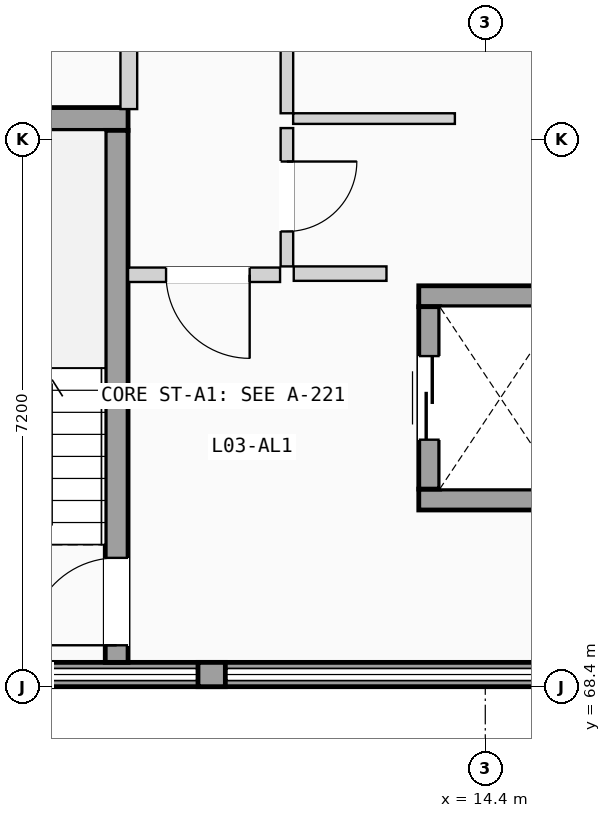
"""IFC4 building model, lengths in metres.
Left out: names, types, materials, properties, quantities, classifications, styles, units other than length and angle.
Written with IfcOpenShell. Run it as: python <this file> out.ifc"""

import sys

from ifc_helpers import new_model, si_unit, direction, frame, frame_2d, origin, place, context, subcontext, project, spatial, rectangle, extrude, element, fill, save


model = new_model("IFC4")
c1 = context("Model", 3, precision=1e-05, world=origin(), true_north=direction((0.0, 1.0)))
c2 = subcontext(c1, "Body", "Model", "MODEL_VIEW")
j1 = project(units=[si_unit("LENGTHUNIT", "METRE"), si_unit("PLANEANGLEUNIT", "RADIAN")], contexts=[c1])
p1 = place(None, origin())
s1 = spatial("IfcSite", under=j1, at=p1, CompositionType="ELEMENT")
p2 = place(p1, origin())
s2 = spatial("IfcBuilding", under=s1, at=p2, CompositionType="ELEMENT")
p3 = place(p2, frame((0.0, 0.0, 12.075)))
s3 = spatial("IfcBuildingStorey", under=s2, at=p3, CompositionType="ELEMENT", Elevation=12.075)
p4 = place(p3, frame((0.0, 68.56, 0.0), z_axis=(0.0, 0.0, 1.0), x_axis=(1.0, 0.0, 0.0)))
e1 = element("IfcWall", 1, at=p4, inside=s3, PredefinedType="SOLIDWALL", context=c2, shape_type="SweptSolid", body=[
    extrude(rectangle(XDim=21.6, YDim=0.32, at=frame_2d((10.8, 0.0))), origin(), (0.0, 0.0, 1.0), 1.11),
])
p5 = place(p3, frame((10.62, 68.56, 1.11), z_axis=(0.0, 0.0, 1.0), x_axis=(1.0, 0.0, 0.0)))
e2 = element("IfcWall", 2, at=p5, inside=s3, PredefinedType="SOLIDWALL", context=c2, shape_type="SweptSolid", body=[
    extrude(rectangle(XDim=0.36, YDim=0.32, at=frame_2d((0.18, 0.0))), origin(), (0.0, 0.0, 1.0), 1.78),
])
p6 = place(p3, frame((5.75, 75.87, 0.0), z_axis=(0.0, 0.0, 1.0), x_axis=(1.0, 0.0, 0.0)))
e3 = element("IfcWall", 3, at=p6, inside=s3, PredefinedType="SHEAR", context=c2, shape_type="SweptSolid", body=[
    extrude(rectangle(XDim=3.95, YDim=0.3, at=frame_2d((1.975, 0.0))), origin(), (0.0, 0.0, 1.0), 2.89),
])
p7 = place(p3, frame((9.55, 68.72, 0.0), z_axis=(0.0, 0.0, 1.0), x_axis=(0.0, 1.0, 0.0)))
e4 = element("IfcWall", 4, at=p7, inside=s3, PredefinedType="SHEAR", context=c2, shape_type="SweptSolid", body=[
    extrude(rectangle(XDim=7.0, YDim=0.3, at=frame_2d((3.5, 0.0))), origin(), (0.0, 0.0, 1.0), 2.89),
])
p8 = place(p7, frame((0.225, 0.0, 0.0)))
e5 = element("IfcOpeningElement", 5, at=p8, cuts=e4, PredefinedType="OPENING", context=c2, shape_type="SweptSolid", body=[
    extrude(rectangle(XDim=1.15, YDim=2.12, at=frame_2d((0.575, 1.06))), frame((0.0, 0.16, 0.0), z_axis=(0.0, -1.0, 0.0), x_axis=(1.0, 0.0, 0.0)), (0.0, 0.0, 1.0), 0.32),
])
for number, where, z_axis, x_axis in (
    (6, (13.525, 70.863, 0.0), (0.0, 0.0, 1.0), (1.0, 0.0, 0.0)),
    (7, (13.525, 73.538, 0.0), (0.0, 0.0, 1.0), (1.0, 0.0, 0.0)),
):
    element("IfcWall", number, at=place(p3, frame(where, z_axis=z_axis, x_axis=x_axis)), inside=s3, PredefinedType="SHEAR", context=c2, shape_type="SweptSolid", body=[
        extrude(rectangle(XDim=2.15, YDim=0.275, at=frame_2d((1.075, 0.0))), origin(), (0.0, 0.0, 1.0), 2.89),
    ])
p9 = place(p3, frame((13.663, 71.0, 0.0), z_axis=(0.0, 0.0, 1.0), x_axis=(0.0, 1.0, 0.0)))
e8 = element("IfcWall", 8, at=p9, inside=s3, PredefinedType="SHEAR", context=c2, shape_type="SweptSolid", body=[
    extrude(rectangle(XDim=2.4, YDim=0.275, at=frame_2d((1.2, 0.0))), origin(), (0.0, 0.0, 1.0), 2.89),
])
p10 = place(p9, frame((0.65, 0.0, 0.0)))
e9 = element("IfcOpeningElement", 9, at=p10, cuts=e8, PredefinedType="OPENING", context=c2, shape_type="SweptSolid", body=[
    extrude(rectangle(XDim=1.1, YDim=2.15, at=frame_2d((0.55, 1.075))), frame((0.0, 0.147, 0.0), z_axis=(0.0, -1.0, 0.0), x_axis=(1.0, 0.0, 0.0)), (0.0, 0.0, 1.0), 0.295),
])
p11 = place(p3, frame((11.88, 73.835, 0.0), z_axis=(0.0, 0.0, 1.0), x_axis=(1.0, 0.0, 0.0)))
e10 = element("IfcWall", 10, at=p11, inside=s3, PredefinedType="PARTITIONING", context=c2, shape_type="SweptSolid", body=[
    extrude(rectangle(XDim=1.22, YDim=0.19, at=frame_2d((0.61, 0.0))), origin(), (0.0, 0.0, 1.0), 2.87),
])
p12 = place(p3, frame((9.7, 73.82, 0.0), z_axis=(0.0, 0.0, 1.0), x_axis=(1.0, 0.0, 0.0)))
e11 = element("IfcWall", 11, at=p12, inside=s3, PredefinedType="PARTITIONING", context=c2, shape_type="SweptSolid", body=[
    extrude(rectangle(XDim=2.0, YDim=0.19, at=frame_2d((1.0, 0.0))), origin(), (0.0, 0.0, 1.0), 2.87),
])
p13 = place(p12, frame((0.5, 0.0, 0.0)))
e12 = element("IfcOpeningElement", 12, at=p13, cuts=e11, PredefinedType="OPENING", context=c2, shape_type="SweptSolid", body=[
    extrude(rectangle(XDim=1.1, YDim=2.12, at=frame_2d((0.55, 1.06))), frame((0.0, 0.105, 0.0), z_axis=(0.0, -1.0, 0.0), x_axis=(1.0, 0.0, 0.0)), (0.0, 0.0, 1.0), 0.21),
])
p14 = place(p3, frame((11.79, 73.93, 0.0), z_axis=(0.0, 0.0, 1.0), x_axis=(0.0, 1.0, 0.0)))
e13 = element("IfcWall", 13, at=p14, inside=s3, PredefinedType="PARTITIONING", context=c2, shape_type="SweptSolid", body=[
    extrude(rectangle(XDim=1.82, YDim=0.165, at=frame_2d((0.91, 0.0))), origin(), (0.0, 0.0, 1.0), 2.87),
])
p15 = place(p14, frame((0.46, 0.0, 0.0)))
e14 = element("IfcOpeningElement", 14, at=p15, cuts=e13, PredefinedType="OPENING", context=c2, shape_type="SweptSolid", body=[
    extrude(rectangle(XDim=0.92, YDim=2.04, at=frame_2d((0.46, 1.02))), frame((0.0, 0.093, 0.0), z_axis=(0.0, -1.0, 0.0), x_axis=(1.0, 0.0, 0.0)), (0.0, 0.0, 1.0), 0.185),
])
p16 = place(p3, frame((11.872, 75.875, 0.0), z_axis=(0.0, 0.0, 1.0), x_axis=(1.0, 0.0, 0.0)))
e15 = element("IfcWall", 15, at=p16, inside=s3, PredefinedType="PARTITIONING", context=c2, shape_type="SweptSolid", body=[
    extrude(rectangle(XDim=2.128, YDim=0.14, at=frame_2d((1.064, 0.0))), origin(), (0.0, 0.0, 1.0), 2.87),
])
p17 = place(p3, frame((9.71, 76.0, 0.0), z_axis=(0.0, 0.0, 1.0), x_axis=(0.0, 1.0, 0.0)))
e16 = element("IfcWall", 16, at=p17, inside=s3, PredefinedType="PLUMBINGWALL", context=c2, shape_type="SweptSolid", body=[
    extrude(rectangle(XDim=4.039, YDim=0.22, at=frame_2d((2.02, 0.0))), origin(), (0.0, 0.0, 1.0), 2.87),
])
p18 = place(p3, frame((11.79, 75.945, 0.0), z_axis=(0.0, 0.0, 1.0), x_axis=(0.0, 1.0, 0.0)))
e17 = element("IfcWall", 17, at=p18, inside=s3, PredefinedType="PARTITIONING", context=c2, shape_type="SweptSolid", body=[
    extrude(rectangle(XDim=6.608, YDim=0.165, at=frame_2d((3.304, 0.0))), origin(), (0.0, 0.0, 1.0), 2.87),
])
p19 = place(p18, frame((2.842, 0.0, 0.0)))
e18 = element("IfcOpeningElement", 18, at=p19, cuts=e17, PredefinedType="OPENING", context=c2, shape_type="SweptSolid", body=[
    extrude(rectangle(XDim=0.98, YDim=2.08, at=frame_2d((0.49, 1.04))), frame((0.0, 0.093, 0.0), z_axis=(0.0, -1.0, 0.0), x_axis=(1.0, 0.0, 0.0)), (0.0, 0.0, 1.0), 0.185),
])
p20 = place(p8, origin())
e19 = element("IfcDoor", 19, at=p20, inside=s3, OperationType="SINGLE_SWING_LEFT", PredefinedType="DOOR", context=c2, shape_type="SweptSolid", body=[
    extrude(rectangle(XDim=1.15, YDim=2.12, at=frame_2d((0.575, 1.06))), frame((0.0, 0.025, 0.0), z_axis=(0.0, -1.0, 0.0), x_axis=(1.0, 0.0, 0.0)), (0.0, 0.0, 1.0), 0.05),
])
fill(e5, e19)
p21 = place(p10, origin())
e20 = element("IfcDoor", 20, at=p21, inside=s3, OperationType="SLIDING_TO_LEFT", PredefinedType="DOOR", context=c2, shape_type="SweptSolid", body=[
    extrude(rectangle(XDim=1.1, YDim=2.15, at=frame_2d((0.55, 1.075))), frame((0.0, 0.025, 0.0), z_axis=(0.0, -1.0, 0.0), x_axis=(1.0, 0.0, 0.0)), (0.0, 0.0, 1.0), 0.05),
])
fill(e9, e20)
p22 = place(p13, frame((1.1, 0.0, 0.0), z_axis=(0.0, 0.0, 1.0), x_axis=(-1.0, 0.0, 0.0)))
e21 = element("IfcDoor", 21, at=p22, inside=s3, OperationType="SINGLE_SWING_RIGHT", PredefinedType="DOOR", context=c2, shape_type="SweptSolid", body=[
    extrude(rectangle(XDim=1.1, YDim=2.12, at=frame_2d((0.55, 1.06))), frame((0.0, 0.025, 0.0), z_axis=(0.0, -1.0, 0.0), x_axis=(1.0, 0.0, 0.0)), (0.0, 0.0, 1.0), 0.05),
])
fill(e12, e21)
p23 = place(p15, frame((0.92, 0.0, 0.0), z_axis=(0.0, 0.0, 1.0), x_axis=(-1.0, 0.0, 0.0)))
e22 = element("IfcDoor", 22, at=p23, inside=s3, OperationType="SINGLE_SWING_RIGHT", PredefinedType="DOOR", context=c2, shape_type="SweptSolid", body=[
    extrude(rectangle(XDim=0.92, YDim=2.04, at=frame_2d((0.46, 1.02))), frame((0.0, 0.025, 0.0), z_axis=(0.0, -1.0, 0.0), x_axis=(1.0, 0.0, 0.0)), (0.0, 0.0, 1.0), 0.05),
])
fill(e14, e22)
save(model, sys.argv[1])
